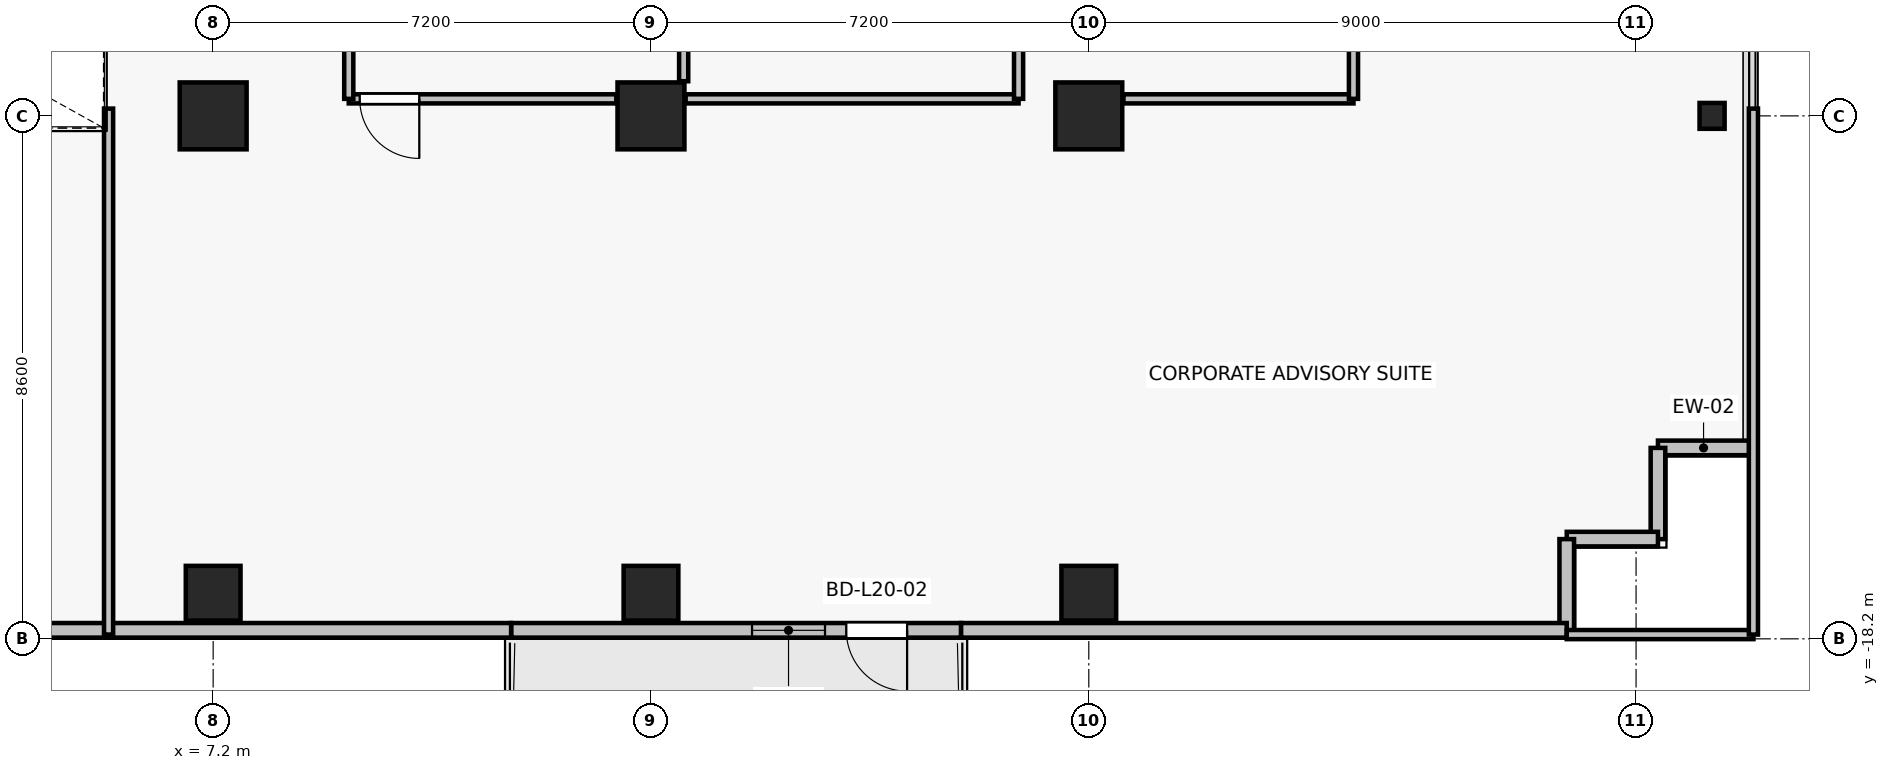
"""IFC4 building model, lengths in metres.
Left out: names, types, materials, properties, quantities, classifications, styles, units other than length and angle.
Written with IfcOpenShell. Run it as: python <this file> out.ifc"""

import sys

from ifc_helpers import new_model, si_unit, direction, frame, frame_2d, origin, origin_2d, place, context, subcontext, project, spatial, rectangle, i_section, extrude, source, transform, mapped, element, fill, save


model = new_model("IFC4")
c1 = context("Model", 3, precision=1e-05, world=origin(), true_north=direction((0.0, 1.0)))
c2 = subcontext(c1, "Body", "Model", "MODEL_VIEW")
j1 = project(units=[si_unit("LENGTHUNIT", "METRE"), si_unit("PLANEANGLEUNIT", "RADIAN")], contexts=[c1])
p1 = place(None, origin())
s1 = spatial("IfcSite", under=j1, at=p1, CompositionType="ELEMENT")
p2 = place(p1, origin())
s2 = spatial("IfcBuilding", under=s1, at=p2, CompositionType="ELEMENT")
p3 = place(p2, frame((0.0, 0.0, 73.6)))
s3 = spatial("IfcBuildingStorey", under=s2, at=p3, CompositionType="ELEMENT", Elevation=73.6)
for number, where, z_axis, x_axis in (
    (1, (7.2, -9.6, 0.0), (0.0, 0.0, 1.0), (1.0, 0.0, 0.0)),
    (2, (14.4, -9.6, 0.0), (0.0, 0.0, 1.0), (1.0, 0.0, 0.0)),
    (3, (21.6, -9.6, 0.0), (0.0, 0.0, 1.0), (1.0, 0.0, 0.0)),
):
    element("IfcColumn", number, at=place(p3, frame(where, z_axis=z_axis, x_axis=x_axis)), inside=s3, PredefinedType="COLUMN", context=c2, shape_type="SweptSolid", body=[
        extrude(rectangle(XDim=1.1, YDim=1.1, at=origin_2d()), origin(), (0.0, 0.0, 1.0), 3.3),
    ])
for number, where, z_axis, x_axis in (
    (4, (7.2, -17.45, 0.0), (0.0, 0.0, 1.0), (1.0, 0.0, 0.0)),
    (5, (14.4, -17.45, 0.0), (0.0, 0.0, 1.0), (1.0, 0.0, 0.0)),
    (6, (21.6, -17.45, 0.0), (0.0, 0.0, 1.0), (1.0, 0.0, 0.0)),
):
    element("IfcColumn", number, at=place(p3, frame(where, z_axis=z_axis, x_axis=x_axis)), inside=s3, PredefinedType="COLUMN", context=c2, shape_type="SweptSolid", body=[
        extrude(rectangle(XDim=0.9, YDim=0.9, at=origin_2d()), origin(), (0.0, 0.0, 1.0), 3.3),
    ])
p4 = place(p3, frame((31.85, -9.6, 0.0), z_axis=(0.0, 0.0, 1.0), x_axis=(1.0, 0.0, 0.0)))
e7 = element("IfcColumn", 7, at=p4, inside=s3, PredefinedType="COLUMN", context=c2, shape_type="SweptSolid", body=[
    extrude(i_section(OverallWidth=0.412, OverallDepth=0.425, WebThickness=0.026, FlangeThickness=0.039, FilletRadius=0.015, at=origin_2d()), origin(), (0.0, 0.0, 1.0), 3.3),
])
p5 = place(p3, frame((19.5, -18.06, 0.0), z_axis=(0.0, 0.0, 1.0), x_axis=(-1.0, 0.0, 0.0)))
e8 = element("IfcWall", 8, at=p5, inside=s3, PredefinedType="SOLIDWALL", context=c2, shape_type="SweptSolid", body=[
    extrude(rectangle(XDim=7.4, YDim=0.24, at=frame_2d((3.7, 0.0))), origin(), (0.0, 0.0, 1.0), 2.665),
])
p6 = place(p5, frame((0.888, 0.0, 0.0)))
e9 = element("IfcOpeningElement", 9, at=p6, cuts=e8, PredefinedType="OPENING", context=c2, shape_type="SweptSolid", body=[
    extrude(rectangle(XDim=1.0, YDim=2.2, at=frame_2d((0.5, 1.1))), frame((0.0, 0.13, 0.0), z_axis=(0.0, -1.0, 0.0), x_axis=(1.0, 0.0, 0.0)), (0.0, 0.0, 1.0), 0.26),
])
p7 = place(p5, frame((2.238, 0.0, 0.85)))
e10 = element("IfcOpeningElement", 10, at=p7, cuts=e8, PredefinedType="OPENING", context=c2, shape_type="SweptSolid", body=[
    extrude(rectangle(XDim=1.2, YDim=1.5, at=frame_2d((0.6, 0.75))), frame((0.0, 0.13, 0.0), z_axis=(0.0, -1.0, 0.0), x_axis=(1.0, 0.0, 0.0)), (0.0, 0.0, 1.0), 0.26),
])
for number, where, z_axis, x_axis in (
    (11, (30.96, -15.06, 0.0), (0.0, 0.0, 1.0), (1.0, 0.0, 0.0)),
    (12, (30.96, -16.56, 0.0), (0.0, 0.0, 1.0), (0.0, 1.0, 0.0)),
    (13, (29.46, -16.56, 0.0), (0.0, 0.0, 1.0), (1.0, 0.0, 0.0)),
    (14, (29.46, -18.06, 0.0), (0.0, 0.0, 1.0), (0.0, 1.0, 0.0)),
):
    element("IfcWall", number, at=place(p3, frame(where, z_axis=z_axis, x_axis=x_axis)), inside=s3, PredefinedType="SOLIDWALL", context=c2, shape_type="SweptSolid", body=[
        extrude(rectangle(XDim=1.5, YDim=0.24, at=frame_2d((0.75, 0.0))), origin(), (0.0, 0.0, 1.0), 3.075),
    ])
p8 = place(p3, frame((19.5, -18.06, 0.0), z_axis=(0.0, 0.0, 1.0), x_axis=(1.0, 0.0, 0.0)))
e15 = element("IfcWall", 15, at=p8, inside=s3, PredefinedType="SOLIDWALL", context=c2, shape_type="SweptSolid", body=[
    extrude(rectangle(XDim=9.96, YDim=0.24, at=frame_2d((4.98, 0.0))), origin(), (0.0, 0.0, 1.0), 2.665),
])
p9 = place(p3, frame((3.34, -18.06, 0.0), z_axis=(0.0, 0.0, 1.0), x_axis=(1.0, 0.0, 0.0)))
e16 = element("IfcWall", 16, at=p9, inside=s3, PredefinedType="SOLIDWALL", context=c2, shape_type="SweptSolid", body=[
    extrude(rectangle(XDim=8.76, YDim=0.24, at=frame_2d((4.38, 0.0))), origin(), (0.0, 0.0, 1.0), 3.075),
])
p10 = place(p3, frame((13.83, -9.32, 0.0), z_axis=(0.0, 0.0, 1.0), x_axis=(-1.0, 0.0, 0.0)))
e17 = element("IfcWall", 17, at=p10, inside=s3, PredefinedType="PARTITIONING", context=c2, shape_type="SweptSolid", body=[
    extrude(rectangle(XDim=4.4, YDim=0.15, at=frame_2d((2.2, 0.0))), origin(), (0.0, 0.0, 1.0), 2.465),
])
p11 = place(p10, frame((3.24, 0.0, 0.0)))
e18 = element("IfcOpeningElement", 18, at=p11, cuts=e17, PredefinedType="OPENING", context=c2, shape_type="SweptSolid", body=[
    extrude(rectangle(XDim=0.98, YDim=2.15, at=frame_2d((0.49, 1.075))), frame((0.0, 0.085, 0.0), z_axis=(0.0, -1.0, 0.0), x_axis=(1.0, 0.0, 0.0)), (0.0, 0.0, 1.0), 0.17),
])
p12 = place(p3, frame((9.43, -9.32, 0.0), z_axis=(0.0, 0.0, 1.0), x_axis=(0.0, 1.0, 0.0)))
e19 = element("IfcWall", 19, at=p12, inside=s3, PredefinedType="PARTITIONING", context=c2, shape_type="SweptSolid", body=[
    extrude(rectangle(XDim=5.49, YDim=0.15, at=frame_2d((2.745, 0.0))), origin(), (0.0, 0.0, 1.0), 2.465),
])
p13 = place(p3, frame((14.938, -3.83, 0.0), z_axis=(0.0, 0.0, 1.0), x_axis=(0.0, -1.0, 0.0)))
e20 = element("IfcWall", 20, at=p13, inside=s3, PredefinedType="PARTITIONING", context=c2, shape_type="SweptSolid", body=[
    extrude(rectangle(XDim=5.2, YDim=0.15, at=frame_2d((2.6, 0.0))), origin(), (0.0, 0.0, 1.0), 2.565),
])
p14 = place(p3, frame((20.445, -9.32, 0.0), z_axis=(0.0, 0.0, 1.0), x_axis=(-1.0, 0.0, 0.0)))
e21 = element("IfcWall", 21, at=p14, inside=s3, PredefinedType="PARTITIONING", context=c2, shape_type="SweptSolid", body=[
    extrude(rectangle(XDim=5.475, YDim=0.15, at=frame_2d((2.738, 0.0))), origin(), (0.0, 0.0, 1.0), 2.465),
])
p15 = place(p3, frame((20.445, -3.83, 0.0), z_axis=(0.0, 0.0, 1.0), x_axis=(0.0, -1.0, 0.0)))
e22 = element("IfcWall", 22, at=p15, inside=s3, PredefinedType="PARTITIONING", context=c2, shape_type="SweptSolid", body=[
    extrude(rectangle(XDim=5.49, YDim=0.15, at=frame_2d((2.745, 0.0))), origin(), (0.0, 0.0, 1.0), 2.465),
])
p16 = place(p3, frame((25.953, -9.32, 0.0), z_axis=(0.0, 0.0, 1.0), x_axis=(-1.0, 0.0, 0.0)))
e23 = element("IfcWall", 23, at=p16, inside=s3, PredefinedType="PARTITIONING", context=c2, shape_type="SweptSolid", body=[
    extrude(rectangle(XDim=3.783, YDim=0.15, at=frame_2d((1.892, 0.0))), origin(), (0.0, 0.0, 1.0), 2.465),
])
p17 = place(p3, frame((25.953, -3.83, 0.0), z_axis=(0.0, 0.0, 1.0), x_axis=(0.0, -1.0, 0.0)))
e24 = element("IfcWall", 24, at=p17, inside=s3, PredefinedType="PARTITIONING", context=c2, shape_type="SweptSolid", body=[
    extrude(rectangle(XDim=5.49, YDim=0.15, at=frame_2d((2.745, 0.0))), origin(), (0.0, 0.0, 1.0), 2.465),
])
p18 = place(p3, frame((32.53, -18.13, 0.0), z_axis=(0.0, 0.0, 1.0), x_axis=(-1.0, 0.0, 0.0)))
e25 = element("IfcWall", 25, at=p18, inside=s3, PredefinedType="PARTITIONING", context=c2, shape_type="SweptSolid", body=[
    extrude(rectangle(XDim=3.07, YDim=0.15, at=frame_2d((1.535, 0.0))), origin(), (0.0, 0.0, 1.0), 2.665),
])
p19 = place(p3, frame((5.48, -18.13, 0.0), z_axis=(0.0, 0.0, 1.0), x_axis=(0.0, 1.0, 0.0)))
e26 = element("IfcWall", 26, at=p19, inside=s3, PredefinedType="PARTITIONING", context=c2, shape_type="SweptSolid", body=[
    extrude(rectangle(XDim=8.65, YDim=0.15, at=frame_2d((4.325, 0.0))), origin(), (0.0, 0.0, 1.0), 2.465),
])
p20 = place(p3, frame((32.53, -9.48, 0.0), z_axis=(0.0, 0.0, 1.0), x_axis=(0.0, -1.0, 0.0)))
e27 = element("IfcWall", 27, at=p20, inside=s3, PredefinedType="PARTITIONING", context=c2, shape_type="SweptSolid", body=[
    extrude(rectangle(XDim=8.65, YDim=0.15, at=frame_2d((4.325, 0.0))), origin(), (0.0, 0.0, 1.0), 3.075),
])
m1 = source(origin(), c2, "Body", "SweptSolid", [
    extrude(rectangle(XDim=1.0, YDim=2.2, at=frame_2d((0.5, 1.1))), frame((0.0, 0.025, 0.0), z_axis=(0.0, -1.0, 0.0), x_axis=(1.0, 0.0, 0.0)), (0.0, 0.0, 1.0), 0.05),
])
p21 = place(p6, origin())
e28 = element("IfcDoor", 28, at=p21, inside=s3, OperationType="SINGLE_SWING_LEFT", PredefinedType="DOOR", context=c2, shape_type="MappedRepresentation", body=[
    mapped(m1, transform((0.0, 0.0, 0.0), x_axis=(1.0, 0.0, 0.0), y_axis=(0.0, 1.0, 0.0), z_axis=(0.0, 0.0, 1.0), scale=1.0)),
])
fill(e9, e28)
m2 = source(origin(), c2, "Body", "SweptSolid", [
    extrude(rectangle(XDim=1.2, YDim=1.5, at=frame_2d((0.6, 0.75))), frame((0.0, 0.03, 0.0), z_axis=(0.0, -1.0, 0.0), x_axis=(1.0, 0.0, 0.0)), (0.0, 0.0, 1.0), 0.06),
])
p22 = place(p7, origin())
e29 = element("IfcWindow", 29, at=p22, inside=s3, PartitioningType="SINGLE_PANEL", PredefinedType="WINDOW", context=c2, shape_type="MappedRepresentation", body=[
    mapped(m2, transform((0.0, 0.0, 0.0), x_axis=(1.0, 0.0, 0.0), y_axis=(0.0, 1.0, 0.0), z_axis=(0.0, 0.0, 1.0), scale=1.0)),
])
fill(e10, e29)
m3 = source(origin(), c2, "Body", "SweptSolid", [
    extrude(rectangle(XDim=0.98, YDim=2.15, at=frame_2d((0.49, 1.075))), frame((0.0, 0.025, 0.0), z_axis=(0.0, -1.0, 0.0), x_axis=(1.0, 0.0, 0.0)), (0.0, 0.0, 1.0), 0.05),
])
p23 = place(p11, origin())
e30 = element("IfcDoor", 30, at=p23, inside=s3, OperationType="SINGLE_SWING_LEFT", PredefinedType="DOOR", context=c2, shape_type="MappedRepresentation", body=[
    mapped(m3, transform((0.0, 0.0, 0.0), x_axis=(1.0, 0.0, 0.0), y_axis=(0.0, 1.0, 0.0), z_axis=(0.0, 0.0, 1.0), scale=1.0)),
])
fill(e18, e30)
save(model, sys.argv[1])
